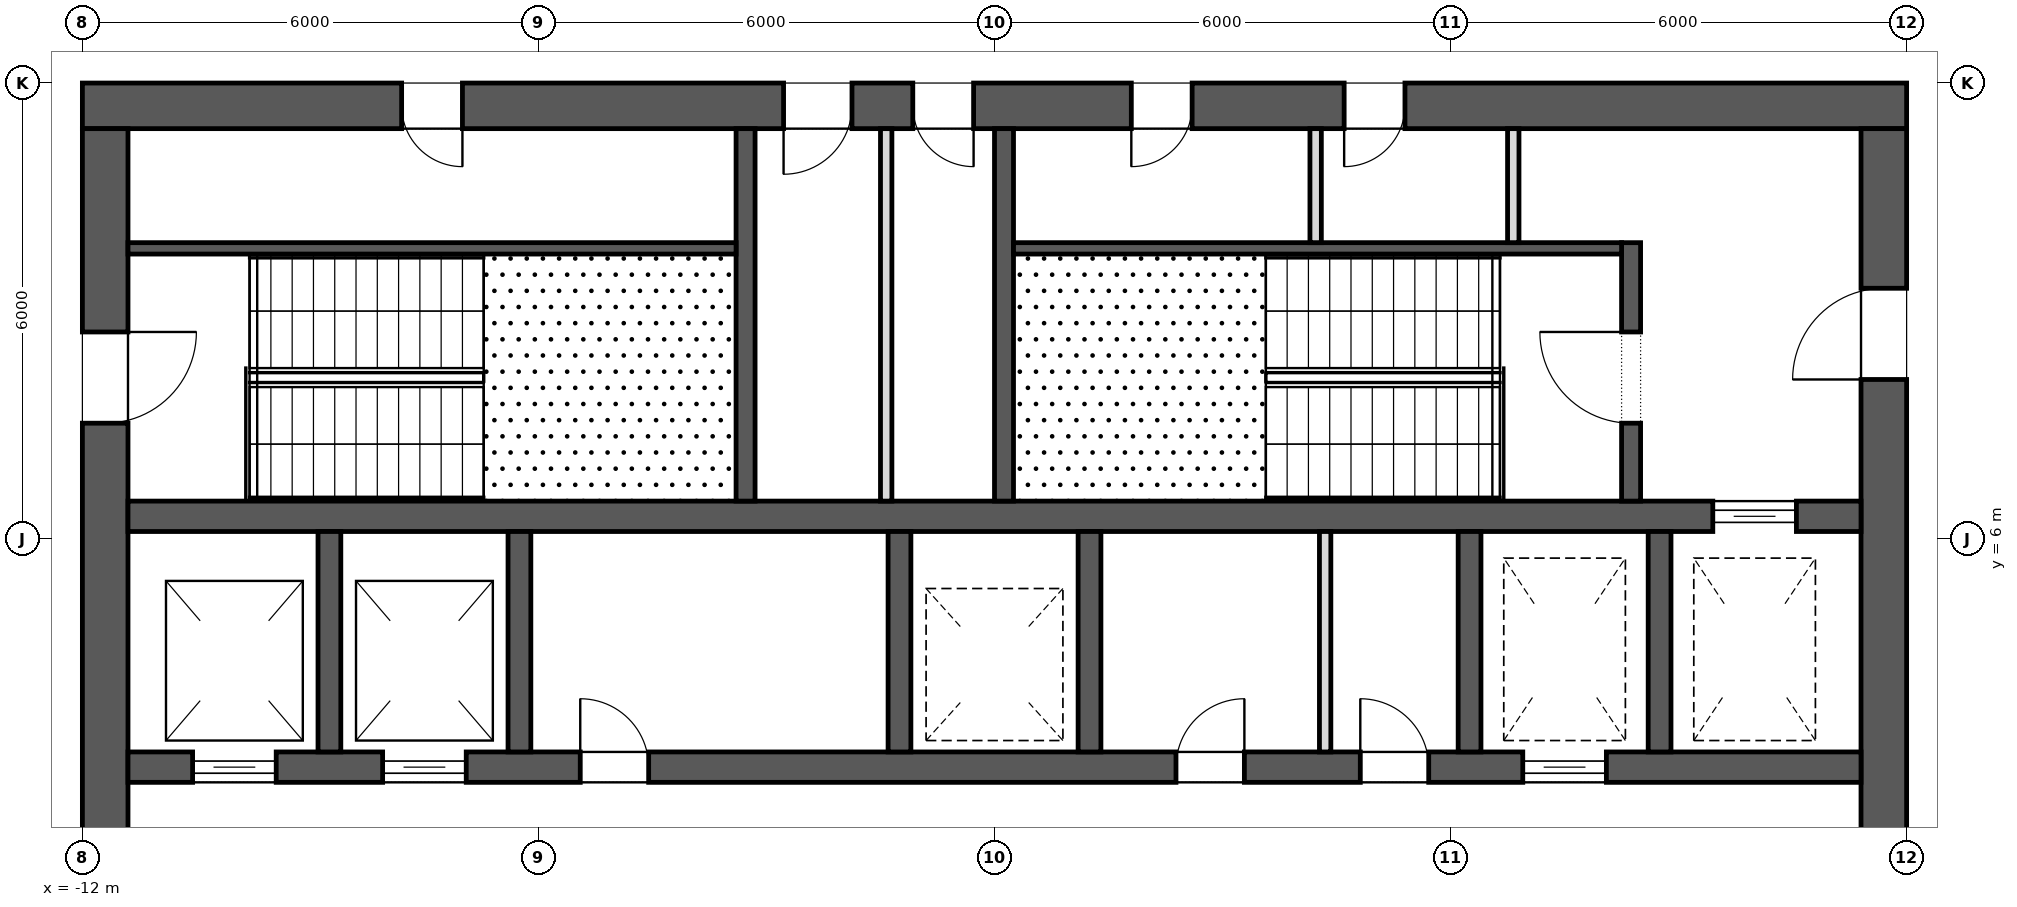
"""IFC4 building model, lengths in metres.
Left out: names, types, materials, properties, quantities, classifications, styles, units other than length and angle.
Written with IfcOpenShell. Run it as: python <this file> out.ifc"""

import sys

from ifc_helpers import new_model, si_unit, direction, frame, frame_2d, origin, place, context, subcontext, project, spatial, rectangle, extrude, element, fill, save


model = new_model("IFC4")
c1 = context("Model", 3, precision=1e-05, world=origin(), true_north=direction((0.0, 1.0)))
c2 = subcontext(c1, "Body", "Model", "MODEL_VIEW")
j1 = project(units=[si_unit("LENGTHUNIT", "METRE"), si_unit("PLANEANGLEUNIT", "RADIAN")], contexts=[c1])
p1 = place(None, origin())
s1 = spatial("IfcSite", under=j1, at=p1, CompositionType="ELEMENT")
p2 = place(p1, origin())
s2 = spatial("IfcBuilding", under=s1, at=p2, CompositionType="ELEMENT")
p3 = place(p2, frame((0.0, 0.0, 256.3)))
s3 = spatial("IfcBuildingStorey", under=s2, at=p3, CompositionType="ELEMENT", Elevation=256.3)
p4 = place(p3, frame((-12.0, 11.7, 0.0), z_axis=(0.0, 0.0, 1.0), x_axis=(1.0, 0.0, 0.0)))
e1 = element("IfcWall", 1, at=p4, inside=s3, PredefinedType="SHEAR", context=c2, shape_type="SweptSolid", body=[
    extrude(rectangle(XDim=24.0, YDim=0.6, at=frame_2d((12.0, 0.0))), origin(), (0.0, 0.0, 1.0), 4.0),
])
p5 = place(p4, frame((9.225, 0.0, 0.0)))
e2 = element("IfcOpeningElement", 2, at=p5, cuts=e1, PredefinedType="OPENING", context=c2, shape_type="SweptSolid", body=[
    extrude(rectangle(XDim=0.9, YDim=2.1, at=frame_2d((0.45, 1.05))), frame((0.0, 0.312, 0.0), z_axis=(0.0, -1.0, 0.0), x_axis=(1.0, 0.0, 0.0)), (0.0, 0.0, 1.0), 0.624),
])
p6 = place(p4, frame((10.925, 0.0, 0.0)))
e3 = element("IfcOpeningElement", 3, at=p6, cuts=e1, PredefinedType="OPENING", context=c2, shape_type="SweptSolid", body=[
    extrude(rectangle(XDim=0.8, YDim=2.1, at=frame_2d((0.4, 1.05))), frame((0.0, 0.312, 0.0), z_axis=(0.0, -1.0, 0.0), x_axis=(1.0, 0.0, 0.0)), (0.0, 0.0, 1.0), 0.624),
])
p7 = place(p4, frame((4.2, 0.0, 0.0)))
e4 = element("IfcOpeningElement", 4, at=p7, cuts=e1, PredefinedType="OPENING", context=c2, shape_type="SweptSolid", body=[
    extrude(rectangle(XDim=0.8, YDim=2.1, at=frame_2d((0.4, 1.05))), frame((0.0, 0.312, 0.0), z_axis=(0.0, -1.0, 0.0), x_axis=(1.0, 0.0, 0.0)), (0.0, 0.0, 1.0), 0.624),
])
p8 = place(p4, frame((13.8, 0.0, 0.0)))
e5 = element("IfcOpeningElement", 5, at=p8, cuts=e1, PredefinedType="OPENING", context=c2, shape_type="SweptSolid", body=[
    extrude(rectangle(XDim=0.8, YDim=2.1, at=frame_2d((0.4, 1.05))), frame((0.0, 0.312, 0.0), z_axis=(0.0, -1.0, 0.0), x_axis=(1.0, 0.0, 0.0)), (0.0, 0.0, 1.0), 0.624),
])
p9 = place(p4, frame((16.6, 0.0, 0.0)))
e6 = element("IfcOpeningElement", 6, at=p9, cuts=e1, PredefinedType="OPENING", context=c2, shape_type="SweptSolid", body=[
    extrude(rectangle(XDim=0.8, YDim=2.1, at=frame_2d((0.4, 1.05))), frame((0.0, 0.312, 0.0), z_axis=(0.0, -1.0, 0.0), x_axis=(1.0, 0.0, 0.0)), (0.0, 0.0, 1.0), 0.624),
])
p10 = place(p3, frame((11.7, -11.4, 0.0), z_axis=(0.0, 0.0, 1.0), x_axis=(0.0, 1.0, 0.0)))
e7 = element("IfcWall", 7, at=p10, inside=s3, PredefinedType="SHEAR", context=c2, shape_type="SweptSolid", body=[
    extrude(rectangle(XDim=22.8, YDim=0.6, at=frame_2d((11.4, 0.0))), origin(), (0.0, 0.0, 1.0), 4.0),
])
p11 = place(p10, frame((10.2, 0.0, 0.0)))
e8 = element("IfcOpeningElement", 8, at=p11, cuts=e7, PredefinedType="OPENING", context=c2, shape_type="SweptSolid", body=[
    extrude(rectangle(XDim=2.4, YDim=2.1, at=frame_2d((1.2, 1.05))), frame((0.0, 0.312, 0.0), z_axis=(0.0, -1.0, 0.0), x_axis=(1.0, 0.0, 0.0)), (0.0, 0.0, 1.0), 0.624),
])
p12 = place(p10, frame((19.5, 0.0, 0.0)))
e9 = element("IfcOpeningElement", 9, at=p12, cuts=e7, PredefinedType="OPENING", context=c2, shape_type="SweptSolid", body=[
    extrude(rectangle(XDim=1.2, YDim=2.1, at=frame_2d((0.6, 1.05))), frame((0.0, 0.312, 0.0), z_axis=(0.0, -1.0, 0.0), x_axis=(1.0, 0.0, 0.0)), (0.0, 0.0, 1.0), 0.624),
])
p13 = place(p10, frame((2.1, 0.0, 0.0)))
e10 = element("IfcOpeningElement", 10, at=p13, cuts=e7, PredefinedType="OPENING", context=c2, shape_type="SweptSolid", body=[
    extrude(rectangle(XDim=1.2, YDim=2.1, at=frame_2d((0.6, 1.05))), frame((0.0, 0.312, 0.0), z_axis=(0.0, -1.0, 0.0), x_axis=(1.0, 0.0, 0.0)), (0.0, 0.0, 1.0), 0.624),
])
p14 = place(p3, frame((-11.7, -11.4, 0.0), z_axis=(0.0, 0.0, 1.0), x_axis=(0.0, 1.0, 0.0)))
e11 = element("IfcWall", 11, at=p14, inside=s3, PredefinedType="SHEAR", context=c2, shape_type="SweptSolid", body=[
    extrude(rectangle(XDim=22.8, YDim=0.6, at=frame_2d((11.4, 0.0))), origin(), (0.0, 0.0, 1.0), 4.0),
])
p15 = place(p14, frame((10.2, 0.0, 0.0)))
e12 = element("IfcOpeningElement", 12, at=p15, cuts=e11, PredefinedType="OPENING", context=c2, shape_type="SweptSolid", body=[
    extrude(rectangle(XDim=2.4, YDim=2.1, at=frame_2d((1.2, 1.05))), frame((0.0, 0.312, 0.0), z_axis=(0.0, -1.0, 0.0), x_axis=(1.0, 0.0, 0.0)), (0.0, 0.0, 1.0), 0.624),
])
p16 = place(p14, frame((18.925, 0.0, 0.0)))
e13 = element("IfcOpeningElement", 13, at=p16, cuts=e11, PredefinedType="OPENING", context=c2, shape_type="SweptSolid", body=[
    extrude(rectangle(XDim=1.2, YDim=2.1, at=frame_2d((0.6, 1.05))), frame((0.0, 0.312, 0.0), z_axis=(0.0, -1.0, 0.0), x_axis=(1.0, 0.0, 0.0)), (0.0, 0.0, 1.0), 0.624),
])
p17 = place(p14, frame((2.675, 0.0, 0.0)))
e14 = element("IfcOpeningElement", 14, at=p17, cuts=e11, PredefinedType="OPENING", context=c2, shape_type="SweptSolid", body=[
    extrude(rectangle(XDim=1.2, YDim=2.1, at=frame_2d((0.6, 1.05))), frame((0.0, 0.312, 0.0), z_axis=(0.0, -1.0, 0.0), x_axis=(1.0, 0.0, 0.0)), (0.0, 0.0, 1.0), 0.624),
])
p18 = place(p3, frame((-11.4, 3.0, 0.0), z_axis=(0.0, 0.0, 1.0), x_axis=(1.0, 0.0, 0.0)))
e15 = element("IfcWall", 15, at=p18, inside=s3, PredefinedType="SHEAR", context=c2, shape_type="SweptSolid", body=[
    extrude(rectangle(XDim=22.8, YDim=0.4, at=frame_2d((11.4, 0.0))), origin(), (0.0, 0.0, 1.0), 4.0),
])
p19 = place(p18, frame((0.85, 0.0, 0.0)))
e16 = element("IfcOpeningElement", 16, at=p19, cuts=e15, PredefinedType="OPENING", context=c2, shape_type="SweptSolid", body=[
    extrude(rectangle(XDim=1.1, YDim=2.1, at=frame_2d((0.55, 1.05))), frame((0.0, 0.212, 0.0), z_axis=(0.0, -1.0, 0.0), x_axis=(1.0, 0.0, 0.0)), (0.0, 0.0, 1.0), 0.424),
])
p20 = place(p18, frame((3.35, 0.0, 0.0)))
e17 = element("IfcOpeningElement", 17, at=p20, cuts=e15, PredefinedType="OPENING", context=c2, shape_type="SweptSolid", body=[
    extrude(rectangle(XDim=1.1, YDim=2.1, at=frame_2d((0.55, 1.05))), frame((0.0, 0.212, 0.0), z_axis=(0.0, -1.0, 0.0), x_axis=(1.0, 0.0, 0.0)), (0.0, 0.0, 1.0), 0.424),
])
p21 = place(p18, frame((18.35, 0.0, 0.0)))
e18 = element("IfcOpeningElement", 18, at=p21, cuts=e15, PredefinedType="OPENING", context=c2, shape_type="SweptSolid", body=[
    extrude(rectangle(XDim=1.1, YDim=2.1, at=frame_2d((0.55, 1.05))), frame((0.0, 0.212, 0.0), z_axis=(0.0, -1.0, 0.0), x_axis=(1.0, 0.0, 0.0)), (0.0, 0.0, 1.0), 0.424),
])
p22 = place(p18, frame((13.788, 0.0, 0.0)))
e19 = element("IfcOpeningElement", 19, at=p22, cuts=e15, PredefinedType="OPENING", context=c2, shape_type="SweptSolid", body=[
    extrude(rectangle(XDim=0.9, YDim=2.1, at=frame_2d((0.45, 1.05))), frame((0.0, 0.212, 0.0), z_axis=(0.0, -1.0, 0.0), x_axis=(1.0, 0.0, 0.0)), (0.0, 0.0, 1.0), 0.424),
])
p23 = place(p18, frame((16.212, 0.0, 0.0)))
e20 = element("IfcOpeningElement", 20, at=p23, cuts=e15, PredefinedType="OPENING", context=c2, shape_type="SweptSolid", body=[
    extrude(rectangle(XDim=0.9, YDim=2.1, at=frame_2d((0.45, 1.05))), frame((0.0, 0.212, 0.0), z_axis=(0.0, -1.0, 0.0), x_axis=(1.0, 0.0, 0.0)), (0.0, 0.0, 1.0), 0.424),
])
p24 = place(p18, frame((5.95, 0.0, 0.0)))
e21 = element("IfcOpeningElement", 21, at=p24, cuts=e15, PredefinedType="OPENING", context=c2, shape_type="SweptSolid", body=[
    extrude(rectangle(XDim=0.9, YDim=2.1, at=frame_2d((0.45, 1.05))), frame((0.0, 0.212, 0.0), z_axis=(0.0, -1.0, 0.0), x_axis=(1.0, 0.0, 0.0)), (0.0, 0.0, 1.0), 0.424),
])
p25 = place(p3, frame((-11.4, 6.3, 0.0), z_axis=(0.0, 0.0, 1.0), x_axis=(1.0, 0.0, 0.0)))
e22 = element("IfcWall", 22, at=p25, inside=s3, PredefinedType="SHEAR", context=c2, shape_type="SweptSolid", body=[
    extrude(rectangle(XDim=22.8, YDim=0.4, at=frame_2d((11.4, 0.0))), origin(), (0.0, 0.0, 1.0), 4.0),
])
p26 = place(p25, frame((20.85, 0.0, 0.0)))
e23 = element("IfcOpeningElement", 23, at=p26, cuts=e22, PredefinedType="OPENING", context=c2, shape_type="SweptSolid", body=[
    extrude(rectangle(XDim=1.1, YDim=2.1, at=frame_2d((0.55, 1.05))), frame((0.0, 0.212, 0.0), z_axis=(0.0, -1.0, 0.0), x_axis=(1.0, 0.0, 0.0)), (0.0, 0.0, 1.0), 0.424),
])
for number, where, z_axis, x_axis in (
    (24, (-8.75, 3.2, 0.0), (0.0, 0.0, 1.0), (0.0, 1.0, 0.0)),
    (25, (-6.25, 3.2, 0.0), (0.0, 0.0, 1.0), (0.0, 1.0, 0.0)),
    (26, (-1.25, 3.2, 0.0), (0.0, 0.0, 1.0), (0.0, 1.0, 0.0)),
    (27, (1.25, 3.2, 0.0), (0.0, 0.0, 1.0), (0.0, 1.0, 0.0)),
    (28, (6.25, 3.2, 0.0), (0.0, 0.0, 1.0), (0.0, 1.0, 0.0)),
    (29, (8.75, 3.2, 0.0), (0.0, 0.0, 1.0), (0.0, 1.0, 0.0)),
):
    element("IfcWall", number, at=place(p3, frame(where, z_axis=z_axis, x_axis=x_axis)), inside=s3, PredefinedType="SHEAR", context=c2, shape_type="SweptSolid", body=[
        extrude(rectangle(XDim=2.9, YDim=0.3, at=frame_2d((1.45, 0.0))), origin(), (0.0, 0.0, 1.0), 4.0),
    ])
for number, where, z_axis, x_axis in (
    (30, (-3.275, 6.5, 0.0), (0.0, 0.0, 1.0), (0.0, 1.0, 0.0)),
    (31, (0.125, 6.5, 0.0), (0.0, 0.0, 1.0), (0.0, 1.0, 0.0)),
):
    element("IfcWall", number, at=place(p3, frame(where, z_axis=z_axis, x_axis=x_axis)), inside=s3, PredefinedType="SHEAR", context=c2, shape_type="SweptSolid", body=[
        extrude(rectangle(XDim=4.9, YDim=0.25, at=frame_2d((2.45, 0.0))), origin(), (0.0, 0.0, 1.0), 3.7),
    ])
p27 = place(p3, frame((8.375, 6.5, 0.0), z_axis=(0.0, 0.0, 1.0), x_axis=(0.0, 1.0, 0.0)))
e32 = element("IfcWall", 32, at=p27, inside=s3, PredefinedType="SHEAR", context=c2, shape_type="SweptSolid", body=[
    extrude(rectangle(XDim=3.4, YDim=0.25, at=frame_2d((1.7, 0.0))), origin(), (0.0, 0.0, 1.0), 3.7),
])
p28 = place(p27, frame((1.025, 0.0, 0.0)))
e33 = element("IfcOpeningElement", 33, at=p28, cuts=e32, PredefinedType="OPENING", context=c2, shape_type="SweptSolid", body=[
    extrude(rectangle(XDim=1.2, YDim=2.1, at=frame_2d((0.6, 1.05))), frame((0.0, 0.137, 0.0), z_axis=(0.0, -1.0, 0.0), x_axis=(1.0, 0.0, 0.0)), (0.0, 0.0, 1.0), 0.274),
])
for number, where, z_axis, x_axis in (
    (34, (-11.4, 9.825, 0.0), (0.0, 0.0, 1.0), (1.0, 0.0, 0.0)),
    (35, (0.25, 9.825, 0.0), (0.0, 0.0, 1.0), (1.0, 0.0, 0.0)),
):
    element("IfcWall", number, at=place(p3, frame(where, z_axis=z_axis, x_axis=x_axis)), inside=s3, PredefinedType="SHEAR", context=c2, shape_type="SweptSolid", body=[
        extrude(rectangle(XDim=8.0, YDim=0.15, at=frame_2d((4.0, 0.0))), origin(), (0.0, 0.0, 1.0), 3.7),
    ])
p29 = place(p3, frame((-1.425, 6.5, 0.0), z_axis=(0.0, 0.0, 1.0), x_axis=(0.0, 1.0, 0.0)))
e36 = element("IfcWall", 36, at=p29, inside=s3, PredefinedType="PARTITIONING", context=c2, shape_type="SweptSolid", body=[
    extrude(rectangle(XDim=4.9, YDim=0.15, at=frame_2d((2.45, 0.0))), origin(), (0.0, 0.0, 1.0), 3.7),
])
for number, where, z_axis, x_axis in (
    (37, (4.225, 9.9, 0.0), (0.0, 0.0, 1.0), (0.0, 1.0, 0.0)),
    (38, (6.825, 9.9, 0.0), (0.0, 0.0, 1.0), (0.0, 1.0, 0.0)),
):
    element("IfcWall", number, at=place(p3, frame(where, z_axis=z_axis, x_axis=x_axis)), inside=s3, PredefinedType="PARTITIONING", context=c2, shape_type="SweptSolid", body=[
        extrude(rectangle(XDim=1.5, YDim=0.15, at=frame_2d((0.75, 0.0))), origin(), (0.0, 0.0, 1.0), 3.7),
    ])
p30 = place(p3, frame((4.35, 3.2, 0.0), z_axis=(0.0, 0.0, 1.0), x_axis=(0.0, 1.0, 0.0)))
e39 = element("IfcWall", 39, at=p30, inside=s3, PredefinedType="PARTITIONING", context=c2, shape_type="SweptSolid", body=[
    extrude(rectangle(XDim=2.9, YDim=0.15, at=frame_2d((1.45, 0.0))), origin(), (0.0, 0.0, 1.0), 3.7),
])
p31 = place(p26, origin())
e40 = element("IfcDoor", 40, at=p31, inside=s3, OperationType="SLIDING_TO_LEFT", PredefinedType="DOOR", context=c2, shape_type="SweptSolid", body=[
    extrude(rectangle(XDim=1.1, YDim=2.1, at=frame_2d((0.55, 1.05))), frame((0.0, 0.025, 0.0), z_axis=(0.0, -1.0, 0.0), x_axis=(1.0, 0.0, 0.0)), (0.0, 0.0, 1.0), 0.05),
])
fill(e23, e40)
p32 = place(p19, origin())
e41 = element("IfcDoor", 41, at=p32, inside=s3, OperationType="SLIDING_TO_LEFT", PredefinedType="DOOR", context=c2, shape_type="SweptSolid", body=[
    extrude(rectangle(XDim=1.1, YDim=2.1, at=frame_2d((0.55, 1.05))), frame((0.0, 0.025, 0.0), z_axis=(0.0, -1.0, 0.0), x_axis=(1.0, 0.0, 0.0)), (0.0, 0.0, 1.0), 0.05),
])
fill(e16, e41)
p33 = place(p20, origin())
e42 = element("IfcDoor", 42, at=p33, inside=s3, OperationType="SLIDING_TO_LEFT", PredefinedType="DOOR", context=c2, shape_type="SweptSolid", body=[
    extrude(rectangle(XDim=1.1, YDim=2.1, at=frame_2d((0.55, 1.05))), frame((0.0, 0.025, 0.0), z_axis=(0.0, -1.0, 0.0), x_axis=(1.0, 0.0, 0.0)), (0.0, 0.0, 1.0), 0.05),
])
fill(e17, e42)
p34 = place(p21, origin())
e43 = element("IfcDoor", 43, at=p34, inside=s3, OperationType="SLIDING_TO_LEFT", PredefinedType="DOOR", context=c2, shape_type="SweptSolid", body=[
    extrude(rectangle(XDim=1.1, YDim=2.1, at=frame_2d((0.55, 1.05))), frame((0.0, 0.025, 0.0), z_axis=(0.0, -1.0, 0.0), x_axis=(1.0, 0.0, 0.0)), (0.0, 0.0, 1.0), 0.05),
])
fill(e18, e43)
p35 = place(p16, frame((1.2, 0.0, 0.0), z_axis=(0.0, 0.0, 1.0), x_axis=(-1.0, 0.0, 0.0)))
e44 = element("IfcDoor", 44, at=p35, inside=s3, OperationType="SINGLE_SWING_RIGHT", PredefinedType="DOOR", context=c2, shape_type="SweptSolid", body=[
    extrude(rectangle(XDim=1.2, YDim=2.1, at=frame_2d((0.6, 1.05))), frame((0.0, 0.025, 0.0), z_axis=(0.0, -1.0, 0.0), x_axis=(1.0, 0.0, 0.0)), (0.0, 0.0, 1.0), 0.05),
])
fill(e13, e44)
p36 = place(p28, origin())
e45 = element("IfcDoor", 45, at=p36, inside=s3, OperationType="SINGLE_SWING_LEFT", PredefinedType="DOOR", context=c2, shape_type="SweptSolid", body=[
    extrude(rectangle(XDim=1.2, YDim=2.1, at=frame_2d((0.6, 1.05))), frame((0.0, 0.025, 0.0), z_axis=(0.0, -1.0, 0.0), x_axis=(1.0, 0.0, 0.0)), (0.0, 0.0, 1.0), 0.05),
])
fill(e33, e45)
p37 = place(p12, origin())
e46 = element("IfcDoor", 46, at=p37, inside=s3, OperationType="SINGLE_SWING_RIGHT", PredefinedType="DOOR", context=c2, shape_type="SweptSolid", body=[
    extrude(rectangle(XDim=1.2, YDim=2.1, at=frame_2d((0.6, 1.05))), frame((0.0, 0.025, 0.0), z_axis=(0.0, -1.0, 0.0), x_axis=(1.0, 0.0, 0.0)), (0.0, 0.0, 1.0), 0.05),
])
fill(e9, e46)
p38 = place(p5, frame((0.9, 0.0, 0.0), z_axis=(0.0, 0.0, 1.0), x_axis=(-1.0, 0.0, 0.0)))
e47 = element("IfcDoor", 47, at=p38, inside=s3, OperationType="SINGLE_SWING_LEFT", PredefinedType="DOOR", context=c2, shape_type="SweptSolid", body=[
    extrude(rectangle(XDim=0.9, YDim=2.1, at=frame_2d((0.45, 1.05))), frame((0.0, 0.025, 0.0), z_axis=(0.0, -1.0, 0.0), x_axis=(1.0, 0.0, 0.0)), (0.0, 0.0, 1.0), 0.05),
])
fill(e2, e47)
p39 = place(p6, frame((0.8, 0.0, 0.0), z_axis=(0.0, 0.0, 1.0), x_axis=(-1.0, 0.0, 0.0)))
e48 = element("IfcDoor", 48, at=p39, inside=s3, OperationType="SINGLE_SWING_RIGHT", PredefinedType="DOOR", context=c2, shape_type="SweptSolid", body=[
    extrude(rectangle(XDim=0.8, YDim=2.1, at=frame_2d((0.4, 1.05))), frame((0.0, 0.025, 0.0), z_axis=(0.0, -1.0, 0.0), x_axis=(1.0, 0.0, 0.0)), (0.0, 0.0, 1.0), 0.05),
])
fill(e3, e48)
p40 = place(p7, frame((0.8, 0.0, 0.0), z_axis=(0.0, 0.0, 1.0), x_axis=(-1.0, 0.0, 0.0)))
e49 = element("IfcDoor", 49, at=p40, inside=s3, OperationType="SINGLE_SWING_RIGHT", PredefinedType="DOOR", context=c2, shape_type="SweptSolid", body=[
    extrude(rectangle(XDim=0.8, YDim=2.1, at=frame_2d((0.4, 1.05))), frame((0.0, 0.025, 0.0), z_axis=(0.0, -1.0, 0.0), x_axis=(1.0, 0.0, 0.0)), (0.0, 0.0, 1.0), 0.05),
])
fill(e4, e49)
p41 = place(p8, frame((0.8, 0.0, 0.0), z_axis=(0.0, 0.0, 1.0), x_axis=(-1.0, 0.0, 0.0)))
e50 = element("IfcDoor", 50, at=p41, inside=s3, OperationType="SINGLE_SWING_LEFT", PredefinedType="DOOR", context=c2, shape_type="SweptSolid", body=[
    extrude(rectangle(XDim=0.8, YDim=2.1, at=frame_2d((0.4, 1.05))), frame((0.0, 0.025, 0.0), z_axis=(0.0, -1.0, 0.0), x_axis=(1.0, 0.0, 0.0)), (0.0, 0.0, 1.0), 0.05),
])
fill(e5, e50)
p42 = place(p9, frame((0.8, 0.0, 0.0), z_axis=(0.0, 0.0, 1.0), x_axis=(-1.0, 0.0, 0.0)))
e51 = element("IfcDoor", 51, at=p42, inside=s3, OperationType="SINGLE_SWING_LEFT", PredefinedType="DOOR", context=c2, shape_type="SweptSolid", body=[
    extrude(rectangle(XDim=0.8, YDim=2.1, at=frame_2d((0.4, 1.05))), frame((0.0, 0.025, 0.0), z_axis=(0.0, -1.0, 0.0), x_axis=(1.0, 0.0, 0.0)), (0.0, 0.0, 1.0), 0.05),
])
fill(e6, e51)
p43 = place(p22, origin())
e52 = element("IfcDoor", 52, at=p43, inside=s3, OperationType="SINGLE_SWING_LEFT", PredefinedType="DOOR", context=c2, shape_type="SweptSolid", body=[
    extrude(rectangle(XDim=0.9, YDim=2.1, at=frame_2d((0.45, 1.05))), frame((0.0, 0.025, 0.0), z_axis=(0.0, -1.0, 0.0), x_axis=(1.0, 0.0, 0.0)), (0.0, 0.0, 1.0), 0.05),
])
fill(e19, e52)
p44 = place(p23, origin())
e53 = element("IfcDoor", 53, at=p44, inside=s3, OperationType="SINGLE_SWING_RIGHT", PredefinedType="DOOR", context=c2, shape_type="SweptSolid", body=[
    extrude(rectangle(XDim=0.9, YDim=2.1, at=frame_2d((0.45, 1.05))), frame((0.0, 0.025, 0.0), z_axis=(0.0, -1.0, 0.0), x_axis=(1.0, 0.0, 0.0)), (0.0, 0.0, 1.0), 0.05),
])
fill(e20, e53)
p45 = place(p24, origin())
e54 = element("IfcDoor", 54, at=p45, inside=s3, OperationType="SINGLE_SWING_RIGHT", PredefinedType="DOOR", context=c2, shape_type="SweptSolid", body=[
    extrude(rectangle(XDim=0.9, YDim=2.1, at=frame_2d((0.45, 1.05))), frame((0.0, 0.025, 0.0), z_axis=(0.0, -1.0, 0.0), x_axis=(1.0, 0.0, 0.0)), (0.0, 0.0, 1.0), 0.05),
])
fill(e21, e54)
save(model, sys.argv[1])
